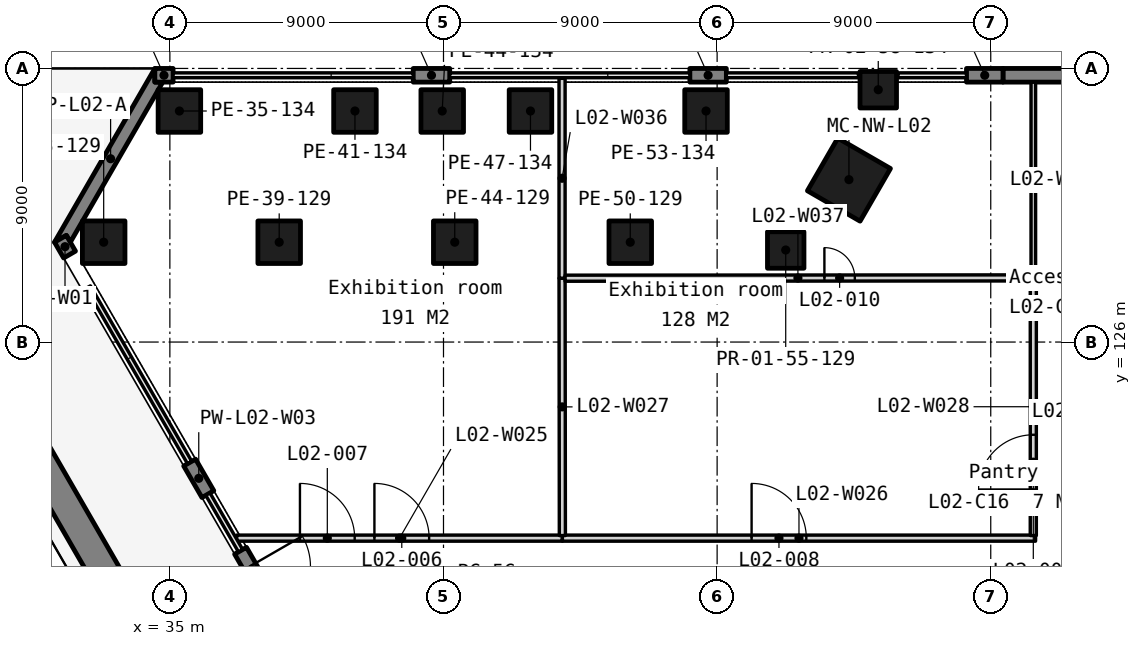
"""IFC4 building model, lengths in metres.
Left out: names, types, materials, properties, quantities, classifications, styles, units other than length and angle.
Written with IfcOpenShell. Run it as: python <this file> out.ifc"""

import sys

from ifc_helpers import new_model, si_unit, direction, frame, frame_2d, origin, origin_2d, place, context, subcontext, project, spatial, polyline, rectangle, outline, extrude, element, fill, save


model = new_model("IFC4")
c1 = context("Model", 3, precision=1e-05, world=origin(), true_north=direction((0.0, 1.0)))
c2 = subcontext(c1, "Body", "Model", "MODEL_VIEW")
j1 = project(units=[si_unit("LENGTHUNIT", "METRE"), si_unit("PLANEANGLEUNIT", "RADIAN")], contexts=[c1])
p1 = place(None, origin())
s1 = spatial("IfcSite", under=j1, at=p1, CompositionType="ELEMENT")
p2 = place(p1, origin())
s2 = spatial("IfcBuilding", under=s1, at=p2, CompositionType="ELEMENT")
p3 = place(p2, frame((0.0, 0.0, 13.5)))
s3 = spatial("IfcBuildingStorey", under=s2, at=p3, CompositionType="ELEMENT", Elevation=13.5)
for number, where, z_axis, x_axis in (
    (1, (32.823, 129.284, 0.0), (0.0, 0.0, 1.0), (1.0, 0.0, 0.0)),
    (2, (35.314, 133.6, 0.0), (0.0, 0.0, 1.0), (1.0, 0.0, 0.0)),
    (3, (38.596, 129.284, 0.0), (0.0, 0.0, 1.0), (1.0, 0.0, 0.0)),
    (4, (41.088, 133.6, 0.0), (0.0, 0.0, 1.0), (1.0, 0.0, 0.0)),
    (5, (44.37, 129.284, 0.0), (0.0, 0.0, 1.0), (1.0, 0.0, 0.0)),
    (6, (43.958, 133.6, 0.0), (0.0, 0.0, 1.0), (1.0, 0.0, 0.0)),
    (7, (46.861, 133.6, 0.0), (0.0, 0.0, 1.0), (1.0, 0.0, 0.0)),
    (8, (50.143, 129.284, 0.0), (0.0, 0.0, 1.0), (1.0, 0.0, 0.0)),
    (9, (52.635, 133.6, 0.0), (0.0, 0.0, 1.0), (1.0, 0.0, 0.0)),
):
    element("IfcColumn", number, at=place(p3, frame(where, z_axis=z_axis, x_axis=x_axis)), inside=s3, PredefinedType="COLUMN", context=c2, shape_type="SweptSolid", body=[
        extrude(rectangle(XDim=1.4, YDim=1.4, at=origin_2d()), origin(), (0.0, 0.0, 1.0), 6.0),
    ])
for number, where, z_axis, x_axis in (
    (10, (55.256, 129.028, 0.0), (0.0, 0.0, 1.0), (1.0, 0.0, 0.0)),
    (11, (58.3, 134.3, 0.0), (0.0, 0.0, 1.0), (1.0, 0.0, 0.0)),
):
    element("IfcColumn", number, at=place(p3, frame(where, z_axis=z_axis, x_axis=x_axis)), inside=s3, PredefinedType="COLUMN", context=c2, shape_type="SweptSolid", body=[
        extrude(rectangle(XDim=1.2, YDim=1.2, at=origin_2d()), origin(), (0.0, 0.0, 1.0), 6.0),
    ])
p4 = place(p3, frame((57.336, 131.342, 0.0), z_axis=(0.0, 0.0, 1.0), x_axis=(-0.5, -0.866025403784, 0.0)))
e12 = element("IfcColumn", 12, at=p4, inside=s3, PredefinedType="COLUMN", context=c2, shape_type="SweptSolid", body=[
    extrude(rectangle(XDim=2.0, YDim=2.0, at=origin_2d()), origin(), (0.0, 0.0, 1.0), 6.0),
])
p5 = place(p3, frame((0.0, 0.0, -0.3)))
e13 = element("IfcWall", 13, at=p5, inside=s3, PredefinedType="SOLIDWALL", context=c2, shape_type="SweptSolid", body=[
    extrude(outline(polyline([(34.506, 135.0), (34.506, 134.55), (34.766, 134.55), (31.726, 129.284), (31.596, 129.509), (31.206, 129.284), (34.506, 135.0)])), origin(), (0.0, 0.0, 1.0), 5.363),
])
p6 = place(p3, frame((70.301, 134.775, -0.3), z_axis=(0.0, 0.0, 1.0), x_axis=(-1.0, 0.0, 0.0)))
e14 = element("IfcWall", 14, at=p6, inside=s3, PredefinedType="SOLIDWALL", context=c2, shape_type="SweptSolid", body=[
    extrude(rectangle(XDim=7.899, YDim=0.45, at=frame_2d((3.949, 0.0))), origin(), (0.0, 0.0, 1.0), 5.363),
])
p7 = place(p3, frame((62.402, 134.775, -0.3), z_axis=(0.0, 0.0, 1.0), x_axis=(-1.0, 0.0, 0.0)))
e15 = element("IfcWall", 15, at=p7, inside=s3, PredefinedType="SOLIDWALL", context=c2, shape_type="SweptSolid", body=[
    extrude(rectangle(XDim=1.2, YDim=0.45, at=frame_2d((0.6, 0.0))), origin(), (0.0, 0.0, 1.0), 5.363),
])
p8 = place(p3, frame((53.304, 134.775, -0.3), z_axis=(0.0, 0.0, 1.0), x_axis=(-1.0, 0.0, 0.0)))
e16 = element("IfcWall", 16, at=p8, inside=s3, PredefinedType="SOLIDWALL", context=c2, shape_type="SweptSolid", body=[
    extrude(rectangle(XDim=1.2, YDim=0.45, at=frame_2d((0.6, 0.0))), origin(), (0.0, 0.0, 1.0), 5.363),
])
p9 = place(p3, frame((44.205, 134.775, -0.3), z_axis=(0.0, 0.0, 1.0), x_axis=(-1.0, 0.0, 0.0)))
e17 = element("IfcWall", 17, at=p9, inside=s3, PredefinedType="SOLIDWALL", context=c2, shape_type="SweptSolid", body=[
    extrude(rectangle(XDim=1.2, YDim=0.45, at=frame_2d((0.6, 0.0))), origin(), (0.0, 0.0, 1.0), 5.363),
])
for number, where, z_axis, x_axis in (
    (18, (35.106, 134.775, -0.3), (0.0, 0.0, 1.0), (-1.0, 0.0, 0.0)),
    (19, (31.401, 129.397, -0.3), (0.0, 0.0, 1.0), (0.5, -0.866, 0.0)),
):
    element("IfcWall", number, at=place(p3, frame(where, z_axis=z_axis, x_axis=x_axis)), inside=s3, PredefinedType="SOLIDWALL", context=c2, shape_type="SweptSolid", body=[
        extrude(rectangle(XDim=0.6, YDim=0.45, at=frame_2d((0.3, 0.0))), origin(), (0.0, 0.0, 1.0), 5.363),
    ])
p10 = place(p3, frame((35.65, 122.037, -0.3), z_axis=(0.0, 0.0, 1.0), x_axis=(0.500033551112, -0.866006032174, 0.0)))
e20 = element("IfcWall", 20, at=p10, inside=s3, PredefinedType="SOLIDWALL", context=c2, shape_type="SweptSolid", body=[
    extrude(rectangle(XDim=1.2, YDim=0.45, at=frame_2d((0.6, 0.0))), origin(), (0.0, 0.0, 1.0), 5.363),
])
p11 = place(p3, frame((37.325, 119.136, -0.3), z_axis=(0.0, 0.0, 1.0), x_axis=(0.499995408039, -0.866028054938, 0.0)))
e21 = element("IfcWall", 21, at=p11, inside=s3, PredefinedType="SOLIDWALL", context=c2, shape_type="SweptSolid", body=[
    extrude(rectangle(XDim=3.2, YDim=0.45, at=frame_2d((1.6, 0.0))), origin(), (0.0, 0.0, 1.0), 5.363),
])
p12 = place(p11, frame((0.6, 0.0, 0.3)))
e22 = element("IfcOpeningElement", 22, at=p12, cuts=e21, PredefinedType="OPENING", context=c2, shape_type="SweptSolid", body=[
    extrude(rectangle(XDim=2.0, YDim=2.4, at=frame_2d((1.0, 1.2))), frame((0.0, 0.235, 0.0), z_axis=(0.0, -1.0, 0.0), x_axis=(1.0, 0.0, 0.0)), (0.0, 0.0, 1.0), 0.47),
])
p13 = place(p3, frame((77.166, 41.679, 0.0), z_axis=(0.0, 0.0, 1.0), x_axis=(-0.500000924498, 0.866024870025, 0.0)))
e23 = element("IfcWall", 23, at=p13, inside=s3, PredefinedType="STANDARD", context=c2, shape_type="SweptSolid", body=[
    extrude(rectangle(XDim=100.935, YDim=1.0, at=frame_2d((50.467, 0.0))), origin(), (0.0, 0.0, 1.0), 0.6),
])
p14 = place(p3, frame((37.198, 119.55, 0.0), z_axis=(0.0, 0.0, 1.0), x_axis=(1.0, 0.0, 0.0)))
e24 = element("IfcWall", 24, at=p14, inside=s3, PredefinedType="PARTITIONING", context=c2, shape_type="SweptSolid", body=[
    extrude(rectangle(XDim=10.712, YDim=0.2, at=frame_2d((5.356, 0.0))), origin(), (0.0, 0.0, 1.0), 5.75),
])
p15 = place(p14, frame((4.53, 0.0, 0.0)))
e25 = element("IfcOpeningElement", 25, at=p15, cuts=e24, PredefinedType="OPENING", context=c2, shape_type="SweptSolid", body=[
    extrude(rectangle(XDim=1.8, YDim=2.1, at=frame_2d((0.9, 1.05))), frame((0.0, 0.11, 0.0), z_axis=(0.0, -1.0, 0.0), x_axis=(1.0, 0.0, 0.0)), (0.0, 0.0, 1.0), 0.22),
])
p16 = place(p14, frame((2.08, 0.0, 0.0)))
e26 = element("IfcOpeningElement", 26, at=p16, cuts=e24, PredefinedType="OPENING", context=c2, shape_type="SweptSolid", body=[
    extrude(rectangle(XDim=1.8, YDim=2.1, at=frame_2d((0.9, 1.05))), frame((0.0, 0.11, 0.0), z_axis=(0.0, -1.0, 0.0), x_axis=(1.0, 0.0, 0.0)), (0.0, 0.0, 1.0), 0.22),
])
p17 = place(p3, frame((47.91, 119.55, 0.0), z_axis=(0.0, 0.0, 1.0), x_axis=(1.0, 0.0, 0.0)))
e27 = element("IfcWall", 27, at=p17, inside=s3, PredefinedType="PARTITIONING", context=c2, shape_type="SweptSolid", body=[
    extrude(rectangle(XDim=15.565, YDim=0.2, at=frame_2d((7.782, 0.0))), origin(), (0.0, 0.0, 1.0), 5.75),
])
p18 = place(p17, frame((6.224, 0.0, 0.0)))
e28 = element("IfcOpeningElement", 28, at=p18, cuts=e27, PredefinedType="OPENING", context=c2, shape_type="SweptSolid", body=[
    extrude(rectangle(XDim=1.8, YDim=2.1, at=frame_2d((0.9, 1.05))), frame((0.0, 0.11, 0.0), z_axis=(0.0, -1.0, 0.0), x_axis=(1.0, 0.0, 0.0)), (0.0, 0.0, 1.0), 0.22),
])
p19 = place(p3, frame((47.91, 119.635, 0.0), z_axis=(0.0, 0.0, 1.0), x_axis=(-0.001182475452, 0.999999300876, 0.0)))
e29 = element("IfcWall", 29, at=p19, inside=s3, PredefinedType="PARTITIONING", context=c2, shape_type="SweptSolid", body=[
    extrude(rectangle(XDim=8.465, YDim=0.2, at=frame_2d((4.232, 0.0))), origin(), (0.0, 0.0, 1.0), 5.75),
])
p20 = place(p3, frame((63.399, 119.635, 0.0), z_axis=(0.0, 0.0, 1.0), x_axis=(5.7613643e-05, 0.99999999834, 0.0)))
e30 = element("IfcWall", 30, at=p20, inside=s3, PredefinedType="PARTITIONING", context=c2, shape_type="SweptSolid", body=[
    extrude(rectangle(XDim=8.475, YDim=0.2, at=frame_2d((4.238, 0.0))), origin(), (0.0, 0.0, 1.0), 5.75),
])
p21 = place(p20, frame((1.515, 0.0, 0.0)))
e31 = element("IfcOpeningElement", 31, at=p21, cuts=e30, PredefinedType="OPENING", context=c2, shape_type="SweptSolid", body=[
    extrude(rectangle(XDim=1.8, YDim=2.1, at=frame_2d((0.9, 1.05))), frame((0.0, 0.11, 0.0), z_axis=(0.0, -1.0, 0.0), x_axis=(1.0, 0.0, 0.0)), (0.0, 0.0, 1.0), 0.22),
])
p22 = place(p3, frame((63.4, 128.11, 0.0), z_axis=(0.0, 0.0, 1.0), x_axis=(0.0, 1.0, 0.0)))
e32 = element("IfcWall", 32, at=p22, inside=s3, PredefinedType="PARTITIONING", context=c2, shape_type="SweptSolid", body=[
    extrude(rectangle(XDim=6.44, YDim=0.15, at=frame_2d((3.22, 0.0))), origin(), (0.0, 0.0, 1.0), 5.75),
])
p23 = place(p3, frame((47.9, 128.1, 0.0), z_axis=(0.0, 0.0, 1.0), x_axis=(0.0, 1.0, 0.0)))
e33 = element("IfcWall", 33, at=p23, inside=s3, PredefinedType="PARTITIONING", context=c2, shape_type="SweptSolid", body=[
    extrude(rectangle(XDim=6.575, YDim=0.2, at=frame_2d((3.288, 0.0))), origin(), (0.0, 0.0, 1.0), 5.75),
])
p24 = place(p3, frame((48.0, 128.1, 0.0), z_axis=(0.0, 0.0, 1.0), x_axis=(0.999999796699, 0.000637653306, 0.0)))
e34 = element("IfcWall", 34, at=p24, inside=s3, PredefinedType="PARTITIONING", context=c2, shape_type="SweptSolid", body=[
    extrude(rectangle(XDim=15.315, YDim=0.2, at=frame_2d((7.657, 0.0))), origin(), (0.0, 0.0, 1.0), 5.75),
])
p25 = place(p24, frame((8.529, 0.0, 0.0)))
e35 = element("IfcOpeningElement", 35, at=p25, cuts=e34, PredefinedType="OPENING", context=c2, shape_type="SweptSolid", body=[
    extrude(rectangle(XDim=1.0, YDim=2.1, at=frame_2d((0.5, 1.05))), frame((0.0, 0.11, 0.0), z_axis=(0.0, -1.0, 0.0), x_axis=(1.0, 0.0, 0.0)), (0.0, 0.0, 1.0), 0.22),
])
p26 = place(p15, origin())
e36 = element("IfcDoor", 36, at=p26, inside=s3, OperationType="SINGLE_SWING_LEFT", PredefinedType="DOOR", context=c2, shape_type="SweptSolid", body=[
    extrude(rectangle(XDim=1.8, YDim=2.1, at=frame_2d((0.9, 1.05))), frame((0.0, 0.025, 0.0), z_axis=(0.0, -1.0, 0.0), x_axis=(1.0, 0.0, 0.0)), (0.0, 0.0, 1.0), 0.05),
])
fill(e25, e36)
p27 = place(p16, origin())
e37 = element("IfcDoor", 37, at=p27, inside=s3, OperationType="SINGLE_SWING_LEFT", PredefinedType="DOOR", context=c2, shape_type="SweptSolid", body=[
    extrude(rectangle(XDim=1.8, YDim=2.1, at=frame_2d((0.9, 1.05))), frame((0.0, 0.025, 0.0), z_axis=(0.0, -1.0, 0.0), x_axis=(1.0, 0.0, 0.0)), (0.0, 0.0, 1.0), 0.05),
])
fill(e26, e37)
p28 = place(p18, origin())
e38 = element("IfcDoor", 38, at=p28, inside=s3, OperationType="SINGLE_SWING_LEFT", PredefinedType="DOOR", context=c2, shape_type="SweptSolid", body=[
    extrude(rectangle(XDim=1.8, YDim=2.1, at=frame_2d((0.9, 1.05))), frame((0.0, 0.025, 0.0), z_axis=(0.0, -1.0, 0.0), x_axis=(1.0, 0.0, 0.0)), (0.0, 0.0, 1.0), 0.05),
])
fill(e28, e38)
p29 = place(p21, origin())
e39 = element("IfcDoor", 39, at=p29, inside=s3, OperationType="SINGLE_SWING_LEFT", PredefinedType="DOOR", context=c2, shape_type="SweptSolid", body=[
    extrude(rectangle(XDim=1.8, YDim=2.1, at=frame_2d((0.9, 1.05))), frame((0.0, 0.025, 0.0), z_axis=(0.0, -1.0, 0.0), x_axis=(1.0, 0.0, 0.0)), (0.0, 0.0, 1.0), 0.05),
])
fill(e31, e39)
p30 = place(p25, origin())
e40 = element("IfcDoor", 40, at=p30, inside=s3, OperationType="SINGLE_SWING_LEFT", PredefinedType="DOOR", context=c2, shape_type="SweptSolid", body=[
    extrude(rectangle(XDim=1.0, YDim=2.1, at=frame_2d((0.5, 1.05))), frame((0.0, 0.025, 0.0), z_axis=(0.0, -1.0, 0.0), x_axis=(1.0, 0.0, 0.0)), (0.0, 0.0, 1.0), 0.05),
])
fill(e35, e40)
save(model, sys.argv[1])
